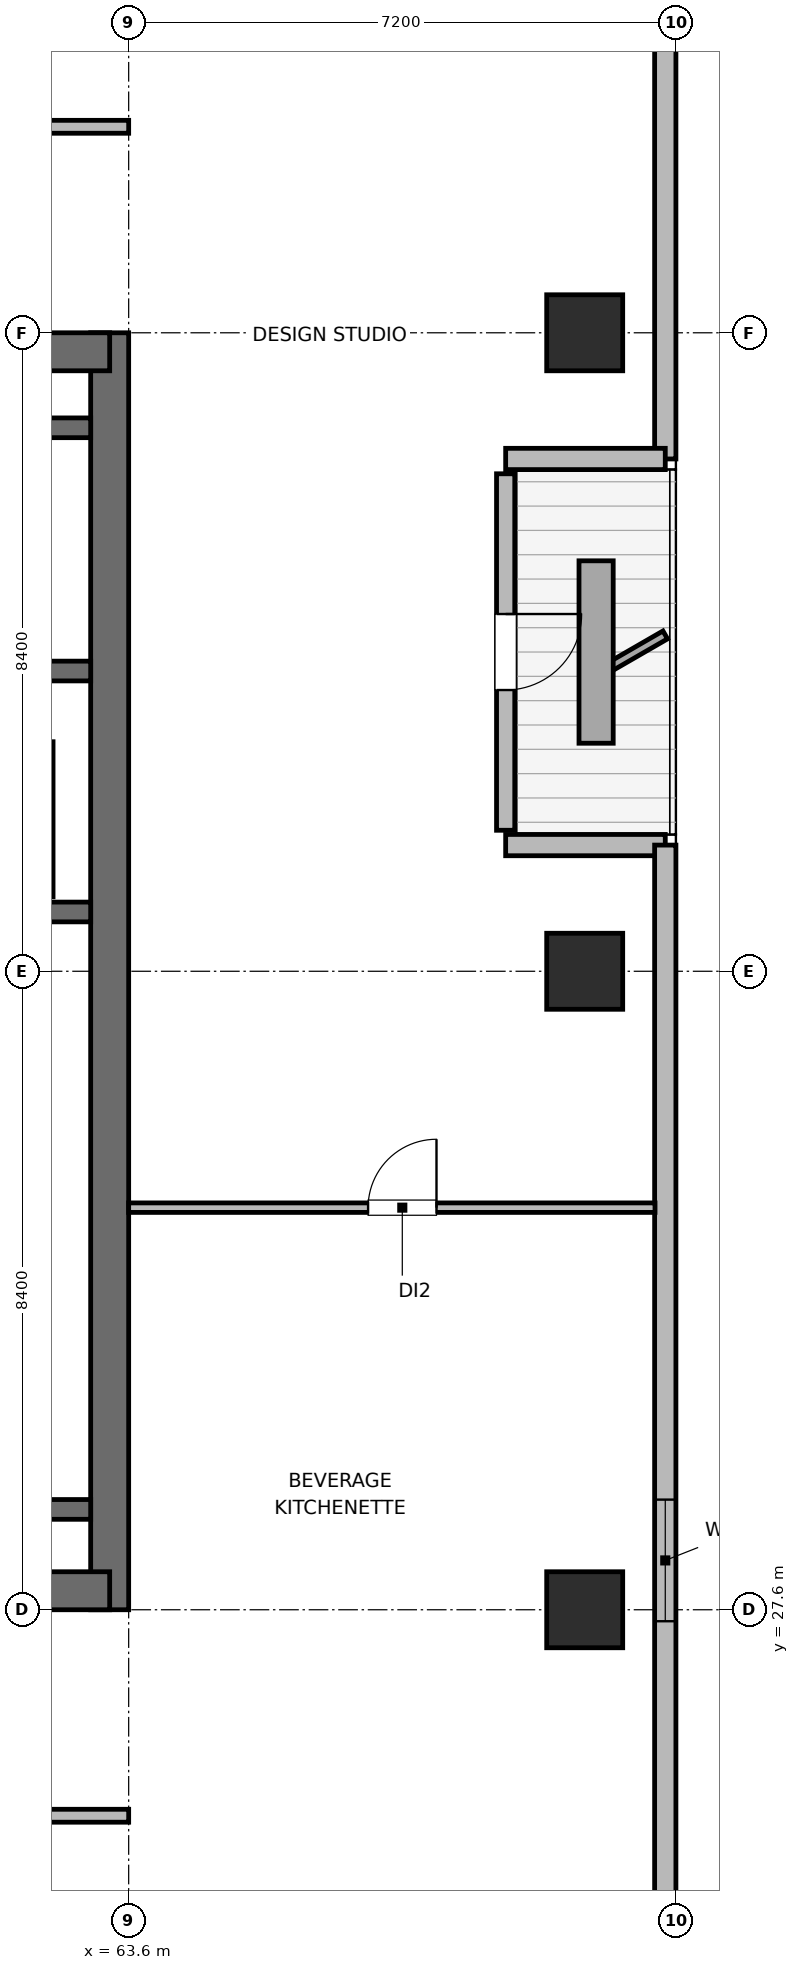
"""IFC4 building model, lengths in metres.
Left out: names, types, materials, properties, quantities, classifications, styles, units other than length and angle.
Written with IfcOpenShell. Run it as: python <this file> out.ifc"""

import sys

from ifc_helpers import new_model, si_unit, direction, frame, frame_2d, origin, origin_2d, place, context, subcontext, project, spatial, rectangle, extrude, element, fill, save


model = new_model("IFC4")
c1 = context("Model", 3, precision=1e-05, world=origin(), true_north=direction((0.0, 1.0)))
c2 = subcontext(c1, "Body", "Model", "MODEL_VIEW")
j1 = project(units=[si_unit("LENGTHUNIT", "METRE"), si_unit("PLANEANGLEUNIT", "RADIAN")], contexts=[c1])
p1 = place(None, origin())
s1 = spatial("IfcSite", under=j1, at=p1, CompositionType="ELEMENT")
p2 = place(p1, origin())
s2 = spatial("IfcBuilding", under=s1, at=p2, CompositionType="ELEMENT")
p3 = place(p2, frame((0.0, 0.0, 262.8)))
s3 = spatial("IfcBuildingStorey", under=s2, at=p3, CompositionType="ELEMENT", Elevation=262.8)
p4 = place(p3, frame((63.35, 27.6, 0.0), z_axis=(0.0, 0.0, 1.0), x_axis=(0.0, 1.0, 0.0)))
e1 = element("IfcWall", 1, at=p4, inside=s3, PredefinedType="SHEAR", context=c2, shape_type="SweptSolid", body=[
    extrude(rectangle(XDim=16.8, YDim=0.5, at=frame_2d((8.4, 0.0))), origin(), (0.0, 0.0, 1.0), 3.9),
])
p5 = place(p3, frame((53.85, 27.85, 0.0), z_axis=(0.0, 0.0, 1.0), x_axis=(1.0, 0.0, 0.0)))
e2 = element("IfcWall", 2, at=p5, inside=s3, PredefinedType="SHEAR", context=c2, shape_type="SweptSolid", body=[
    extrude(rectangle(XDim=9.5, YDim=0.5, at=frame_2d((4.75, 0.0))), origin(), (0.0, 0.0, 1.0), 3.9),
])
p6 = place(p5, frame((4.025, 0.0, 0.0)))
e3 = element("IfcOpeningElement", 3, at=p6, cuts=e2, PredefinedType="OPENING", context=c2, shape_type="SweptSolid", body=[
    extrude(rectangle(XDim=1.05, YDim=2.04, at=frame_2d((0.525, 1.02))), frame((0.0, 0.26, 0.0), z_axis=(0.0, -1.0, 0.0), x_axis=(1.0, 0.0, 0.0)), (0.0, 0.0, 1.0), 0.52),
])
p7 = place(p3, frame((53.85, 44.15, 0.0), z_axis=(0.0, 0.0, 1.0), x_axis=(1.0, 0.0, 0.0)))
e4 = element("IfcWall", 4, at=p7, inside=s3, PredefinedType="SHEAR", context=c2, shape_type="SweptSolid", body=[
    extrude(rectangle(XDim=9.5, YDim=0.5, at=frame_2d((4.75, 0.0))), origin(), (0.0, 0.0, 1.0), 3.9),
])
for number, where, z_axis, x_axis in (
    (5, (58.89, 28.92, 0.0), (0.0, 0.0, 1.0), (1.0, 0.0, 0.0)),
    (6, (58.89, 36.78, 0.0), (0.0, 0.0, 1.0), (1.0, 0.0, 0.0)),
):
    element("IfcWall", number, at=place(p3, frame(where, z_axis=z_axis, x_axis=x_axis)), inside=s3, PredefinedType="SHEAR", context=c2, shape_type="SweptSolid", body=[
        extrude(rectangle(XDim=4.21, YDim=0.26, at=frame_2d((2.105, 0.0))), origin(), (0.0, 0.0, 1.0), 3.9),
    ])
p8 = place(p3, frame((54.1, 39.95, 0.0), z_axis=(0.0, 0.0, 1.0), x_axis=(1.0, 0.0, 0.0)))
e7 = element("IfcWall", 7, at=p8, inside=s3, PredefinedType="SHEAR", context=c2, shape_type="SweptSolid", body=[
    extrude(rectangle(XDim=9.0, YDim=0.26, at=frame_2d((4.5, 0.0))), origin(), (0.0, 0.0, 1.0), 3.9),
])
p9 = place(p8, frame((1.1, 0.0, 0.0)))
e8 = element("IfcOpeningElement", 8, at=p9, cuts=e7, PredefinedType="OPENING", context=c2, shape_type="SweptSolid", body=[
    extrude(rectangle(XDim=1.0, YDim=2.04, at=frame_2d((0.5, 1.02))), frame((0.0, 0.14, 0.0), z_axis=(0.0, -1.0, 0.0), x_axis=(1.0, 0.0, 0.0)), (0.0, 0.0, 1.0), 0.28),
])
p10 = place(p3, frame((54.1, 43.15, 0.0), z_axis=(0.0, 0.0, 1.0), x_axis=(1.0, 0.0, 0.0)))
e9 = element("IfcWall", 9, at=p10, inside=s3, PredefinedType="SHEAR", context=c2, shape_type="SweptSolid", body=[
    extrude(rectangle(XDim=9.0, YDim=0.26, at=frame_2d((4.5, 0.0))), origin(), (0.0, 0.0, 1.0), 3.9),
])
for number, where, z_axis, x_axis in (
    (10, (69.6, 27.6, 0.0), (0.0, 0.0, 1.0), (1.0, 0.0, 0.0)),
    (11, (69.6, 36.0, 0.0), (0.0, 0.0, 1.0), (1.0, 0.0, 0.0)),
    (12, (69.6, 44.4, 0.0), (0.0, 0.0, 1.0), (1.0, 0.0, 0.0)),
):
    element("IfcColumn", number, at=place(p3, frame(where, z_axis=z_axis, x_axis=x_axis)), inside=s3, PredefinedType="COLUMN", context=c2, shape_type="SweptSolid", body=[
        extrude(rectangle(XDim=1.0, YDim=1.0, at=origin_2d()), origin(), (0.0, 0.0, 1.0), 3.9),
    ])
p11 = place(p3, frame((70.66, 48.582, 0.0), z_axis=(0.0, 0.0, 1.0), x_axis=(0.0, -1.0, 0.0)))
e13 = element("IfcWall", 13, at=p11, inside=s3, PredefinedType="SOLIDWALL", context=c2, shape_type="SweptSolid", body=[
    extrude(rectangle(XDim=5.842, YDim=0.28, at=frame_2d((2.921, 0.0))), origin(), (0.0, 0.0, 1.0), 3.68),
])
p12 = place(p3, frame((70.66, 42.74, 0.0), z_axis=(0.0, 0.0, 1.0), x_axis=(-1.0, 0.0, 0.0)))
e14 = element("IfcWall", 14, at=p12, inside=s3, PredefinedType="SOLIDWALL", context=c2, shape_type="SweptSolid", body=[
    extrude(rectangle(XDim=2.1, YDim=0.28, at=frame_2d((1.05, 0.0))), origin(), (0.0, 0.0, 1.0), 3.126),
])
p13 = place(p3, frame((68.56, 42.545, 0.0), z_axis=(0.0, 0.0, 1.0), x_axis=(0.0, -1.0, 0.0)))
e15 = element("IfcWall", 15, at=p13, inside=s3, PredefinedType="SOLIDWALL", context=c2, shape_type="SweptSolid", body=[
    extrude(rectangle(XDim=4.69, YDim=0.24, at=frame_2d((2.345, 0.0))), origin(), (0.0, 0.0, 1.0), 3.311),
])
p14 = place(p13, frame((1.845, 0.0, 0.0)))
e16 = element("IfcOpeningElement", 16, at=p14, cuts=e15, PredefinedType="OPENING", context=c2, shape_type="SweptSolid", body=[
    extrude(rectangle(XDim=1.0, YDim=2.02, at=frame_2d((0.5, 1.01))), frame((0.0, 0.13, 0.0), z_axis=(0.0, -1.0, 0.0), x_axis=(1.0, 0.0, 0.0)), (0.0, 0.0, 1.0), 0.26),
])
p15 = place(p3, frame((68.56, 37.66, 0.0), z_axis=(0.0, 0.0, 1.0), x_axis=(1.0, 0.0, 0.0)))
e17 = element("IfcWall", 17, at=p15, inside=s3, PredefinedType="SOLIDWALL", context=c2, shape_type="SweptSolid", body=[
    extrude(rectangle(XDim=2.1, YDim=0.28, at=frame_2d((1.05, 0.0))), origin(), (0.0, 0.0, 1.0), 3.126),
])
p16 = place(p3, frame((70.66, 37.66, 0.0), z_axis=(0.0, 0.0, 1.0), x_axis=(0.0, -1.0, 0.0)))
e18 = element("IfcWall", 18, at=p16, inside=s3, PredefinedType="SOLIDWALL", context=c2, shape_type="SweptSolid", body=[
    extrude(rectangle(XDim=14.241, YDim=0.28, at=frame_2d((7.121, 0.0))), origin(), (0.0, 0.0, 1.0), 3.68),
])
p17 = place(p16, frame((8.611, 0.0, 0.85)))
e19 = element("IfcOpeningElement", 19, at=p17, cuts=e18, PredefinedType="OPENING", context=c2, shape_type="SweptSolid", body=[
    extrude(rectangle(XDim=1.6, YDim=1.0, at=frame_2d((0.8, 0.5))), frame((0.0, 0.15, 0.0), z_axis=(0.0, -1.0, 0.0), x_axis=(1.0, 0.0, 0.0)), (0.0, 0.0, 1.0), 0.3),
])
p18 = place(p3, frame((62.5, 36.98, 0.0), z_axis=(0.0, 0.0, 1.0), x_axis=(0.0, 1.0, 0.0)))
e20 = element("IfcWall", 20, at=p18, inside=s3, PredefinedType="PARTITIONING", context=c2, shape_type="SweptSolid", body=[
    extrude(rectangle(XDim=2.04, YDim=0.21, at=frame_2d((1.02, 0.0))), origin(), (0.0, 0.0, 1.0), 3.68),
])
p19 = place(p3, frame((29.8, 24.89, 0.0), z_axis=(0.0, 0.0, 1.0), x_axis=(1.0, 0.0, 0.0)))
e21 = element("IfcWall", 21, at=p19, inside=s3, PredefinedType="PARTITIONING", context=c2, shape_type="SweptSolid", body=[
    extrude(rectangle(XDim=33.8, YDim=0.17, at=frame_2d((16.9, 0.0))), origin(), (0.0, 0.0, 1.0), 3.68),
])
p20 = place(p19, frame((2.875, 0.0, 0.0)))
e22 = element("IfcOpeningElement", 22, at=p20, cuts=e21, PredefinedType="OPENING", context=c2, shape_type="SweptSolid", body=[
    extrude(rectangle(XDim=0.95, YDim=2.04, at=frame_2d((0.475, 1.02))), frame((0.0, 0.095, 0.0), z_axis=(0.0, -1.0, 0.0), x_axis=(1.0, 0.0, 0.0)), (0.0, 0.0, 1.0), 0.19),
])
p21 = place(p19, frame((14.225, 0.0, 0.0)))
e23 = element("IfcOpeningElement", 23, at=p21, cuts=e21, PredefinedType="OPENING", context=c2, shape_type="SweptSolid", body=[
    extrude(rectangle(XDim=0.95, YDim=2.04, at=frame_2d((0.475, 1.02))), frame((0.0, 0.095, 0.0), z_axis=(0.0, -1.0, 0.0), x_axis=(1.0, 0.0, 0.0)), (0.0, 0.0, 1.0), 0.19),
])
p22 = place(p19, frame((27.775, 0.0, 0.0)))
e24 = element("IfcOpeningElement", 24, at=p22, cuts=e21, PredefinedType="OPENING", context=c2, shape_type="SweptSolid", body=[
    extrude(rectangle(XDim=0.95, YDim=2.04, at=frame_2d((0.475, 1.02))), frame((0.0, 0.095, 0.0), z_axis=(0.0, -1.0, 0.0), x_axis=(1.0, 0.0, 0.0)), (0.0, 0.0, 1.0), 0.19),
])
p23 = place(p3, frame((29.8, 47.11, 0.0), z_axis=(0.0, 0.0, 1.0), x_axis=(1.0, 0.0, 0.0)))
e25 = element("IfcWall", 25, at=p23, inside=s3, PredefinedType="PARTITIONING", context=c2, shape_type="SweptSolid", body=[
    extrude(rectangle(XDim=33.8, YDim=0.17, at=frame_2d((16.9, 0.0))), origin(), (0.0, 0.0, 1.0), 3.68),
])
p24 = place(p23, frame((0.725, 0.0, 0.0)))
e26 = element("IfcOpeningElement", 26, at=p24, cuts=e25, PredefinedType="OPENING", context=c2, shape_type="SweptSolid", body=[
    extrude(rectangle(XDim=0.95, YDim=2.04, at=frame_2d((0.475, 1.02))), frame((0.0, 0.095, 0.0), z_axis=(0.0, -1.0, 0.0), x_axis=(1.0, 0.0, 0.0)), (0.0, 0.0, 1.0), 0.19),
])
p25 = place(p23, frame((4.425, 0.0, 0.0)))
e27 = element("IfcOpeningElement", 27, at=p25, cuts=e25, PredefinedType="OPENING", context=c2, shape_type="SweptSolid", body=[
    extrude(rectangle(XDim=0.95, YDim=2.04, at=frame_2d((0.475, 1.02))), frame((0.0, 0.095, 0.0), z_axis=(0.0, -1.0, 0.0), x_axis=(1.0, 0.0, 0.0)), (0.0, 0.0, 1.0), 0.19),
])
p26 = place(p23, frame((9.425, 0.0, 0.0)))
e28 = element("IfcOpeningElement", 28, at=p26, cuts=e25, PredefinedType="OPENING", context=c2, shape_type="SweptSolid", body=[
    extrude(rectangle(XDim=0.95, YDim=2.04, at=frame_2d((0.475, 1.02))), frame((0.0, 0.095, 0.0), z_axis=(0.0, -1.0, 0.0), x_axis=(1.0, 0.0, 0.0)), (0.0, 0.0, 1.0), 0.19),
])
p27 = place(p23, frame((14.925, 0.0, 0.0)))
e29 = element("IfcOpeningElement", 29, at=p27, cuts=e25, PredefinedType="OPENING", context=c2, shape_type="SweptSolid", body=[
    extrude(rectangle(XDim=0.95, YDim=2.04, at=frame_2d((0.475, 1.02))), frame((0.0, 0.095, 0.0), z_axis=(0.0, -1.0, 0.0), x_axis=(1.0, 0.0, 0.0)), (0.0, 0.0, 1.0), 0.19),
])
p28 = place(p23, frame((20.925, 0.0, 0.0)))
e30 = element("IfcOpeningElement", 30, at=p28, cuts=e25, PredefinedType="OPENING", context=c2, shape_type="SweptSolid", body=[
    extrude(rectangle(XDim=0.95, YDim=2.04, at=frame_2d((0.475, 1.02))), frame((0.0, 0.095, 0.0), z_axis=(0.0, -1.0, 0.0), x_axis=(1.0, 0.0, 0.0)), (0.0, 0.0, 1.0), 0.19),
])
p29 = place(p23, frame((26.725, 0.0, 0.0)))
e31 = element("IfcOpeningElement", 31, at=p29, cuts=e25, PredefinedType="OPENING", context=c2, shape_type="SweptSolid", body=[
    extrude(rectangle(XDim=0.95, YDim=2.04, at=frame_2d((0.475, 1.02))), frame((0.0, 0.095, 0.0), z_axis=(0.0, -1.0, 0.0), x_axis=(1.0, 0.0, 0.0)), (0.0, 0.0, 1.0), 0.19),
])
p30 = place(p23, frame((31.425, 0.0, 0.0)))
e32 = element("IfcOpeningElement", 32, at=p30, cuts=e25, PredefinedType="OPENING", context=c2, shape_type="SweptSolid", body=[
    extrude(rectangle(XDim=0.95, YDim=2.04, at=frame_2d((0.475, 1.02))), frame((0.0, 0.095, 0.0), z_axis=(0.0, -1.0, 0.0), x_axis=(1.0, 0.0, 0.0)), (0.0, 0.0, 1.0), 0.19),
])
p31 = place(p3, frame((63.6, 32.89, 0.0), z_axis=(0.0, 0.0, 1.0), x_axis=(1.0, 0.0, 0.0)))
e33 = element("IfcWall", 33, at=p31, inside=s3, PredefinedType="PARTITIONING", context=c2, shape_type="SweptSolid", body=[
    extrude(rectangle(XDim=6.925, YDim=0.125, at=frame_2d((3.462, 0.0))), origin(), (0.0, 0.0, 1.0), 3.68),
])
p32 = place(p31, frame((3.15, 0.0, 0.0)))
e34 = element("IfcOpeningElement", 34, at=p32, cuts=e33, PredefinedType="OPENING", context=c2, shape_type="SweptSolid", body=[
    extrude(rectangle(XDim=0.9, YDim=2.02, at=frame_2d((0.45, 1.01))), frame((0.0, 0.073, 0.0), z_axis=(0.0, -1.0, 0.0), x_axis=(1.0, 0.0, 0.0)), (0.0, 0.0, 1.0), 0.145),
])
p33 = place(p14, origin())
e35 = element("IfcDoor", 35, at=p33, inside=s3, OperationType="SINGLE_SWING_LEFT", PredefinedType="DOOR", context=c2, shape_type="SweptSolid", body=[
    extrude(rectangle(XDim=1.0, YDim=2.02, at=frame_2d((0.5, 1.01))), frame((0.0, 0.025, 0.0), z_axis=(0.0, -1.0, 0.0), x_axis=(1.0, 0.0, 0.0)), (0.0, 0.0, 1.0), 0.05),
])
fill(e16, e35)
p34 = place(p17, origin())
e36 = element("IfcWindow", 36, at=p34, inside=s3, PartitioningType="SINGLE_PANEL", PredefinedType="WINDOW", context=c2, shape_type="SweptSolid", body=[
    extrude(rectangle(XDim=1.6, YDim=1.0, at=frame_2d((0.8, 0.5))), frame((0.0, 0.03, 0.0), z_axis=(0.0, -1.0, 0.0), x_axis=(1.0, 0.0, 0.0)), (0.0, 0.0, 1.0), 0.06),
])
fill(e19, e36)
p35 = place(p32, origin())
e37 = element("IfcDoor", 37, at=p35, inside=s3, OperationType="SINGLE_SWING_RIGHT", PredefinedType="DOOR", context=c2, shape_type="SweptSolid", body=[
    extrude(rectangle(XDim=0.9, YDim=2.02, at=frame_2d((0.45, 1.01))), frame((0.0, 0.025, 0.0), z_axis=(0.0, -1.0, 0.0), x_axis=(1.0, 0.0, 0.0)), (0.0, 0.0, 1.0), 0.05),
])
fill(e34, e37)
save(model, sys.argv[1])
